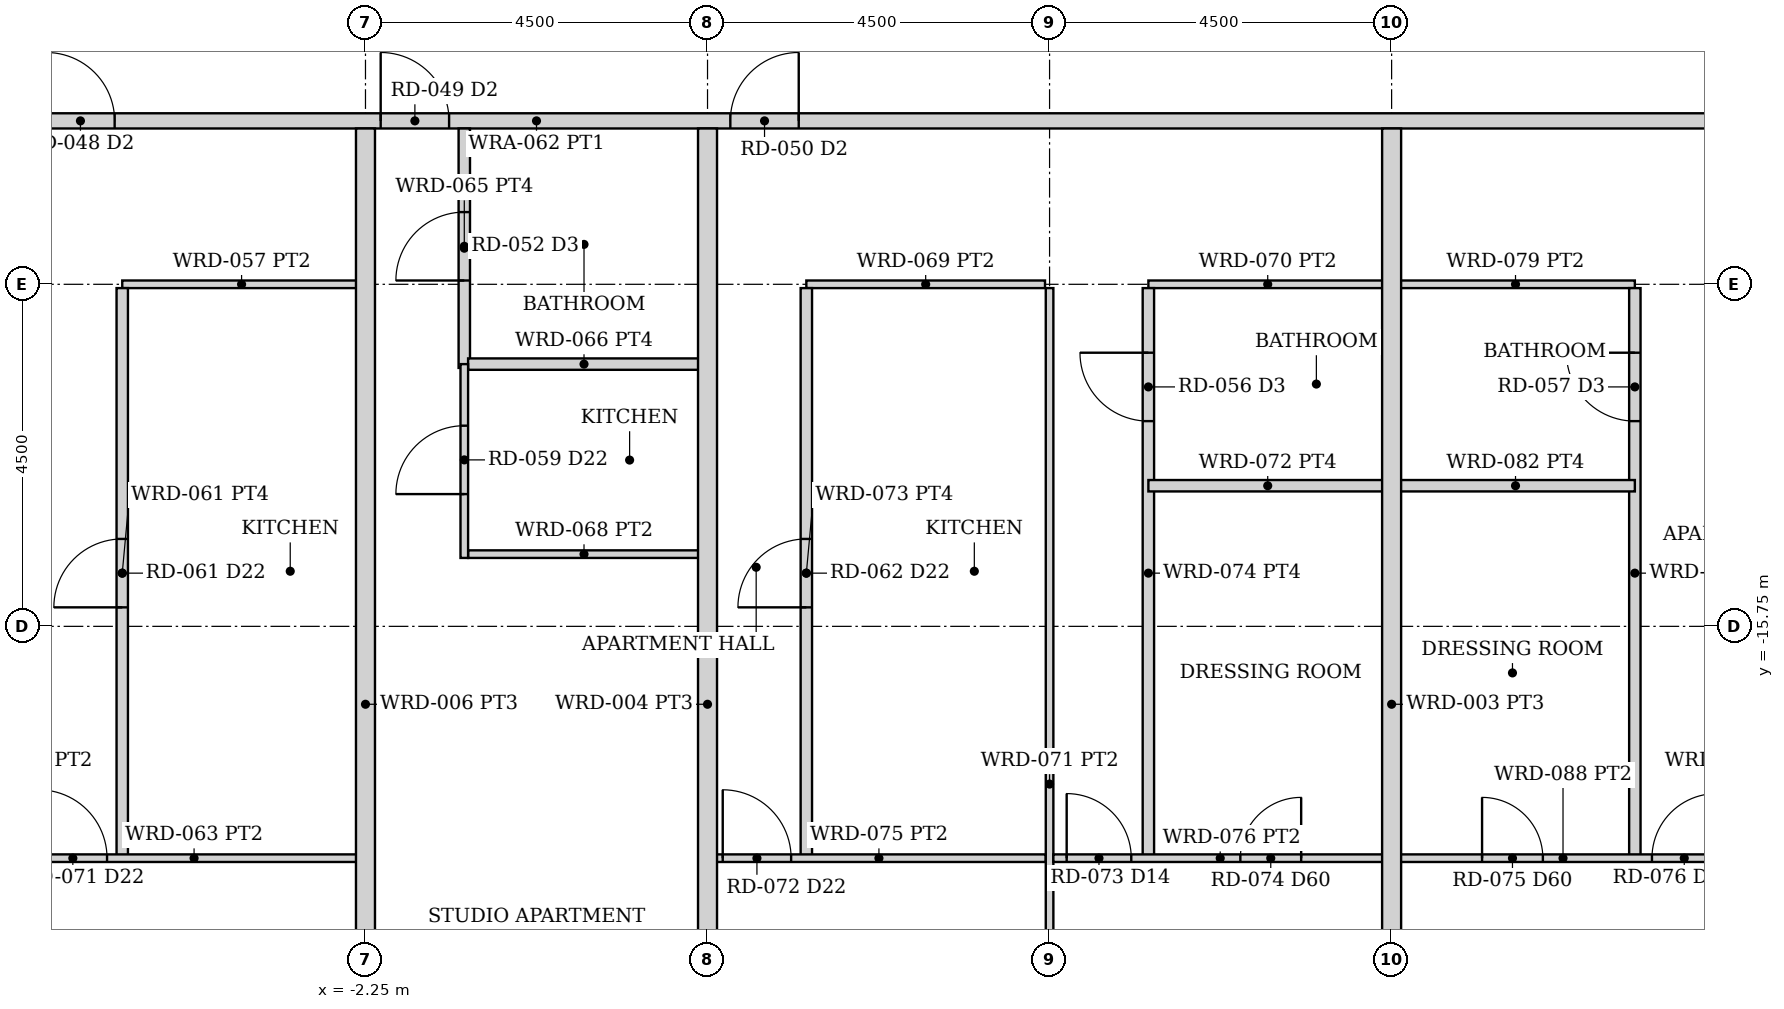
"""IFC4 building model, lengths in metres.
Left out: names, types, materials, properties, quantities, classifications, styles, units other than length and angle.
Written with IfcOpenShell. Run it as: python <this file> out.ifc"""

import sys

from ifc_helpers import new_model, si_unit, direction, frame, frame_2d, origin, place, context, subcontext, project, spatial, rectangle, extrude, element, fill, save


model = new_model("IFC4")
c1 = context("Model", 3, precision=1e-05, world=origin(), true_north=direction((0.0, 1.0)))
c2 = subcontext(c1, "Body", "Model", "MODEL_VIEW")
j1 = project(units=[si_unit("LENGTHUNIT", "METRE"), si_unit("PLANEANGLEUNIT", "RADIAN")], contexts=[c1])
p1 = place(None, origin())
s1 = spatial("IfcSite", under=j1, at=p1, CompositionType="ELEMENT")
p2 = place(p1, origin())
s2 = spatial("IfcBuilding", under=s1, at=p2, CompositionType="ELEMENT")
p3 = place(p2, frame((0.0, 0.0, 58.0)))
s3 = spatial("IfcBuildingStorey", under=s2, at=p3, CompositionType="ELEMENT", Elevation=58.0)
p4 = place(p3, frame((-24.55, -9.1, 0.0), z_axis=(0.0, 0.0, 1.0), x_axis=(1.0, 0.0, 0.0)))
e1 = element("IfcWall", 1, at=p4, inside=s3, PredefinedType="PARTITIONING", context=c2, shape_type="SweptSolid", body=[
    extrude(rectangle(XDim=49.1, YDim=0.2, at=frame_2d((24.55, 0.0))), origin(), (0.0, 0.0, 1.0), 2.373),
])
p5 = place(p4, frame((5.1, 0.0, 0.0)))
e2 = element("IfcOpeningElement", 2, at=p5, cuts=e1, PredefinedType="OPENING", context=c2, shape_type="SweptSolid", body=[
    extrude(rectangle(XDim=0.9, YDim=2.1, at=frame_2d((0.45, 1.05))), frame((0.0, 0.11, 0.0), z_axis=(0.0, -1.0, 0.0), x_axis=(1.0, 0.0, 0.0)), (0.0, 0.0, 1.0), 0.22),
])
p6 = place(p4, frame((18.1, 0.0, 0.0)))
e3 = element("IfcOpeningElement", 3, at=p6, cuts=e1, PredefinedType="OPENING", context=c2, shape_type="SweptSolid", body=[
    extrude(rectangle(XDim=0.9, YDim=2.1, at=frame_2d((0.45, 1.05))), frame((0.0, 0.11, 0.0), z_axis=(0.0, -1.0, 0.0), x_axis=(1.0, 0.0, 0.0)), (0.0, 0.0, 1.0), 0.22),
])
p7 = place(p4, frame((22.5, 0.0, 0.0)))
e4 = element("IfcOpeningElement", 4, at=p7, cuts=e1, PredefinedType="OPENING", context=c2, shape_type="SweptSolid", body=[
    extrude(rectangle(XDim=0.9, YDim=2.1, at=frame_2d((0.45, 1.05))), frame((0.0, 0.11, 0.0), z_axis=(0.0, -1.0, 0.0), x_axis=(1.0, 0.0, 0.0)), (0.0, 0.0, 1.0), 0.22),
])
p8 = place(p4, frame((27.1, 0.0, 0.0)))
e5 = element("IfcOpeningElement", 5, at=p8, cuts=e1, PredefinedType="OPENING", context=c2, shape_type="SweptSolid", body=[
    extrude(rectangle(XDim=0.9, YDim=2.1, at=frame_2d((0.45, 1.05))), frame((0.0, 0.11, 0.0), z_axis=(0.0, -1.0, 0.0), x_axis=(1.0, 0.0, 0.0)), (0.0, 0.0, 1.0), 0.22),
])
p9 = place(p4, frame((43.1, 0.0, 0.0)))
e6 = element("IfcOpeningElement", 6, at=p9, cuts=e1, PredefinedType="OPENING", context=c2, shape_type="SweptSolid", body=[
    extrude(rectangle(XDim=0.9, YDim=2.1, at=frame_2d((0.45, 1.05))), frame((0.0, 0.11, 0.0), z_axis=(0.0, -1.0, 0.0), x_axis=(1.0, 0.0, 0.0)), (0.0, 0.0, 1.0), 0.22),
])
p10 = place(p3, frame((-5.45, -11.25, 0.0), z_axis=(0.0, 0.0, 1.0), x_axis=(1.0, 0.0, 0.0)))
e7 = element("IfcWall", 7, at=p10, inside=s3, PredefinedType="PARTITIONING", context=c2, shape_type="SweptSolid", body=[
    extrude(rectangle(XDim=3.14, YDim=0.1, at=frame_2d((1.57, 0.0))), origin(), (0.0, 0.0, 1.0), 2.373),
])
p11 = place(p3, frame((-5.45, -18.8, 0.0), z_axis=(0.0, 0.0, 1.0), x_axis=(0.0, 1.0, 0.0)))
e8 = element("IfcWall", 8, at=p11, inside=s3, PredefinedType="PARTITIONING", context=c2, shape_type="SweptSolid", body=[
    extrude(rectangle(XDim=7.5, YDim=0.15, at=frame_2d((3.75, 0.0))), origin(), (0.0, 0.0, 1.0), 2.373),
])
p12 = place(p11, frame((3.3, 0.0, 0.0)))
e9 = element("IfcOpeningElement", 9, at=p12, cuts=e8, PredefinedType="OPENING", context=c2, shape_type="SweptSolid", body=[
    extrude(rectangle(XDim=0.9, YDim=2.1, at=frame_2d((0.45, 1.05))), frame((0.0, 0.085, 0.0), z_axis=(0.0, -1.0, 0.0), x_axis=(1.0, 0.0, 0.0)), (0.0, 0.0, 1.0), 0.17),
])
p13 = place(p3, frame((-6.7, -18.8, 0.0), z_axis=(0.0, 0.0, 1.0), x_axis=(1.0, 0.0, 0.0)))
e10 = element("IfcWall", 10, at=p13, inside=s3, PredefinedType="PARTITIONING", context=c2, shape_type="SweptSolid", body=[
    extrude(rectangle(XDim=4.39, YDim=0.1, at=frame_2d((2.195, 0.0))), origin(), (0.0, 0.0, 1.0), 2.373),
])
p14 = place(p13, frame((0.15, 0.0, 0.0)))
e11 = element("IfcOpeningElement", 11, at=p14, cuts=e10, PredefinedType="OPENING", context=c2, shape_type="SweptSolid", body=[
    extrude(rectangle(XDim=0.9, YDim=2.1, at=frame_2d((0.45, 1.05))), frame((0.0, 0.06, 0.0), z_axis=(0.0, -1.0, 0.0), x_axis=(1.0, 0.0, 0.0)), (0.0, 0.0, 1.0), 0.12),
])
p15 = place(p3, frame((-0.95, -12.35, 0.0), z_axis=(0.0, 0.0, 1.0), x_axis=(0.0, 1.0, 0.0)))
e12 = element("IfcWall", 12, at=p15, inside=s3, PredefinedType="PARTITIONING", context=c2, shape_type="SweptSolid", body=[
    extrude(rectangle(XDim=3.15, YDim=0.15, at=frame_2d((1.575, 0.0))), origin(), (0.0, 0.0, 1.0), 2.373),
])
p16 = place(p15, frame((1.15, 0.0, 0.0)))
e13 = element("IfcOpeningElement", 13, at=p16, cuts=e12, PredefinedType="OPENING", context=c2, shape_type="SweptSolid", body=[
    extrude(rectangle(XDim=0.9, YDim=2.1, at=frame_2d((0.45, 1.05))), frame((0.0, 0.085, 0.0), z_axis=(0.0, -1.0, 0.0), x_axis=(1.0, 0.0, 0.0)), (0.0, 0.0, 1.0), 0.17),
])
p17 = place(p3, frame((-0.9, -12.3, 0.0), z_axis=(0.0, 0.0, 1.0), x_axis=(1.0, 0.0, 0.0)))
e14 = element("IfcWall", 14, at=p17, inside=s3, PredefinedType="PARTITIONING", context=c2, shape_type="SweptSolid", body=[
    extrude(rectangle(XDim=3.05, YDim=0.15, at=frame_2d((1.525, 0.0))), origin(), (0.0, 0.0, 1.0), 2.373),
])
p18 = place(p3, frame((-0.9, -14.8, 0.0), z_axis=(0.0, 0.0, 1.0), x_axis=(1.0, 0.0, 0.0)))
e15 = element("IfcWall", 15, at=p18, inside=s3, PredefinedType="PARTITIONING", context=c2, shape_type="SweptSolid", body=[
    extrude(rectangle(XDim=3.05, YDim=0.1, at=frame_2d((1.525, 0.0))), origin(), (0.0, 0.0, 1.0), 2.373),
])
p19 = place(p3, frame((-0.95, -14.85, 0.0), z_axis=(0.0, 0.0, 1.0), x_axis=(0.0, 1.0, 0.0)))
e16 = element("IfcWall", 16, at=p19, inside=s3, PredefinedType="PARTITIONING", context=c2, shape_type="SweptSolid", body=[
    extrude(rectangle(XDim=2.55, YDim=0.1, at=frame_2d((1.275, 0.0))), origin(), (0.0, 0.0, 1.0), 2.373),
])
p20 = place(p19, frame((0.84, 0.0, 0.0)))
e17 = element("IfcOpeningElement", 17, at=p20, cuts=e16, PredefinedType="OPENING", context=c2, shape_type="SweptSolid", body=[
    extrude(rectangle(XDim=0.9, YDim=2.1, at=frame_2d((0.45, 1.05))), frame((0.0, 0.06, 0.0), z_axis=(0.0, -1.0, 0.0), x_axis=(1.0, 0.0, 0.0)), (0.0, 0.0, 1.0), 0.12),
])
p21 = place(p3, frame((3.55, -11.25, 0.0), z_axis=(0.0, 0.0, 1.0), x_axis=(1.0, 0.0, 0.0)))
e18 = element("IfcWall", 18, at=p21, inside=s3, PredefinedType="PARTITIONING", context=c2, shape_type="SweptSolid", body=[
    extrude(rectangle(XDim=3.14, YDim=0.1, at=frame_2d((1.57, 0.0))), origin(), (0.0, 0.0, 1.0), 2.373),
])
p22 = place(p3, frame((3.55, -18.8, 0.0), z_axis=(0.0, 0.0, 1.0), x_axis=(0.0, 1.0, 0.0)))
e19 = element("IfcWall", 19, at=p22, inside=s3, PredefinedType="PARTITIONING", context=c2, shape_type="SweptSolid", body=[
    extrude(rectangle(XDim=7.5, YDim=0.15, at=frame_2d((3.75, 0.0))), origin(), (0.0, 0.0, 1.0), 2.373),
])
p23 = place(p22, frame((3.3, 0.0, 0.0)))
e20 = element("IfcOpeningElement", 20, at=p23, cuts=e19, PredefinedType="OPENING", context=c2, shape_type="SweptSolid", body=[
    extrude(rectangle(XDim=0.9, YDim=2.1, at=frame_2d((0.45, 1.05))), frame((0.0, 0.085, 0.0), z_axis=(0.0, -1.0, 0.0), x_axis=(1.0, 0.0, 0.0)), (0.0, 0.0, 1.0), 0.17),
])
p24 = place(p3, frame((2.31, -18.8, 0.0), z_axis=(0.0, 0.0, 1.0), x_axis=(1.0, 0.0, 0.0)))
e21 = element("IfcWall", 21, at=p24, inside=s3, PredefinedType="PARTITIONING", context=c2, shape_type="SweptSolid", body=[
    extrude(rectangle(XDim=4.39, YDim=0.1, at=frame_2d((2.195, 0.0))), origin(), (0.0, 0.0, 1.0), 2.373),
])
p25 = place(p24, frame((0.14, 0.0, 0.0)))
e22 = element("IfcOpeningElement", 22, at=p25, cuts=e21, PredefinedType="OPENING", context=c2, shape_type="SweptSolid", body=[
    extrude(rectangle(XDim=0.9, YDim=2.1, at=frame_2d((0.45, 1.05))), frame((0.0, 0.06, 0.0), z_axis=(0.0, -1.0, 0.0), x_axis=(1.0, 0.0, 0.0)), (0.0, 0.0, 1.0), 0.12),
])
p26 = place(p3, frame((6.75, -24.35, 0.0), z_axis=(0.0, 0.0, 1.0), x_axis=(0.0, 1.0, 0.0)))
e23 = element("IfcWall", 23, at=p26, inside=s3, PredefinedType="PARTITIONING", context=c2, shape_type="SweptSolid", body=[
    extrude(rectangle(XDim=13.05, YDim=0.1, at=frame_2d((6.525, 0.0))), origin(), (0.0, 0.0, 1.0), 2.373),
])
p27 = place(p3, frame((8.05, -11.25, 0.0), z_axis=(0.0, 0.0, 1.0), x_axis=(1.0, 0.0, 0.0)))
e24 = element("IfcWall", 24, at=p27, inside=s3, PredefinedType="PARTITIONING", context=c2, shape_type="SweptSolid", body=[
    extrude(rectangle(XDim=3.14, YDim=0.1, at=frame_2d((1.57, 0.0))), origin(), (0.0, 0.0, 1.0), 2.373),
])
p28 = place(p3, frame((8.05, -18.8, 0.0), z_axis=(0.0, 0.0, 1.0), x_axis=(0.0, 1.0, 0.0)))
e25 = element("IfcWall", 25, at=p28, inside=s3, PredefinedType="PARTITIONING", context=c2, shape_type="SweptSolid", body=[
    extrude(rectangle(XDim=7.5, YDim=0.15, at=frame_2d((3.75, 0.0))), origin(), (0.0, 0.0, 1.0), 2.373),
])
p29 = place(p28, frame((5.75, 0.0, 0.0)))
e26 = element("IfcOpeningElement", 26, at=p29, cuts=e25, PredefinedType="OPENING", context=c2, shape_type="SweptSolid", body=[
    extrude(rectangle(XDim=0.9, YDim=2.1, at=frame_2d((0.45, 1.05))), frame((0.0, 0.085, 0.0), z_axis=(0.0, -1.0, 0.0), x_axis=(1.0, 0.0, 0.0)), (0.0, 0.0, 1.0), 0.17),
])
p30 = place(p3, frame((6.8, -18.8, 0.0), z_axis=(0.0, 0.0, 1.0), x_axis=(1.0, 0.0, 0.0)))
e27 = element("IfcWall", 27, at=p30, inside=s3, PredefinedType="PARTITIONING", context=c2, shape_type="SweptSolid", body=[
    extrude(rectangle(XDim=4.39, YDim=0.1, at=frame_2d((2.195, 0.0))), origin(), (0.0, 0.0, 1.0), 2.373),
])
p31 = place(p30, frame((0.175, 0.0, 0.0)))
e28 = element("IfcOpeningElement", 28, at=p31, cuts=e27, PredefinedType="OPENING", context=c2, shape_type="SweptSolid", body=[
    extrude(rectangle(XDim=0.85, YDim=2.1, at=frame_2d((0.425, 1.05))), frame((0.0, 0.06, 0.0), z_axis=(0.0, -1.0, 0.0), x_axis=(1.0, 0.0, 0.0)), (0.0, 0.0, 1.0), 0.12),
])
p32 = place(p30, frame((2.46, 0.0, 0.0)))
e29 = element("IfcOpeningElement", 29, at=p32, cuts=e27, PredefinedType="OPENING", context=c2, shape_type="SweptSolid", body=[
    extrude(rectangle(XDim=0.8, YDim=2.1, at=frame_2d((0.4, 1.05))), frame((0.0, 0.06, 0.0), z_axis=(0.0, -1.0, 0.0), x_axis=(1.0, 0.0, 0.0)), (0.0, 0.0, 1.0), 0.12),
])
p33 = place(p3, frame((8.05, -13.9, 0.0), z_axis=(0.0, 0.0, 1.0), x_axis=(1.0, 0.0, 0.0)))
e30 = element("IfcWall", 30, at=p33, inside=s3, PredefinedType="PARTITIONING", context=c2, shape_type="SweptSolid", body=[
    extrude(rectangle(XDim=3.14, YDim=0.15, at=frame_2d((1.57, 0.0))), origin(), (0.0, 0.0, 1.0), 2.373),
])
p34 = place(p3, frame((11.31, -11.25, 0.0), z_axis=(0.0, 0.0, 1.0), x_axis=(1.0, 0.0, 0.0)))
e31 = element("IfcWall", 31, at=p34, inside=s3, PredefinedType="PARTITIONING", context=c2, shape_type="SweptSolid", body=[
    extrude(rectangle(XDim=3.14, YDim=0.1, at=frame_2d((1.57, 0.0))), origin(), (0.0, 0.0, 1.0), 2.373),
])
p35 = place(p3, frame((14.45, -18.8, 0.0), z_axis=(0.0, 0.0, 1.0), x_axis=(0.0, 1.0, 0.0)))
e32 = element("IfcWall", 32, at=p35, inside=s3, PredefinedType="PARTITIONING", context=c2, shape_type="SweptSolid", body=[
    extrude(rectangle(XDim=7.5, YDim=0.15, at=frame_2d((3.75, 0.0))), origin(), (0.0, 0.0, 1.0), 2.373),
])
p36 = place(p35, frame((5.75, 0.0, 0.0)))
e33 = element("IfcOpeningElement", 33, at=p36, cuts=e32, PredefinedType="OPENING", context=c2, shape_type="SweptSolid", body=[
    extrude(rectangle(XDim=0.9, YDim=2.1, at=frame_2d((0.45, 1.05))), frame((0.0, 0.085, 0.0), z_axis=(0.0, -1.0, 0.0), x_axis=(1.0, 0.0, 0.0)), (0.0, 0.0, 1.0), 0.17),
])
p37 = place(p3, frame((11.31, -18.8, 0.0), z_axis=(0.0, 0.0, 1.0), x_axis=(1.0, 0.0, 0.0)))
e34 = element("IfcWall", 34, at=p37, inside=s3, PredefinedType="PARTITIONING", context=c2, shape_type="SweptSolid", body=[
    extrude(rectangle(XDim=4.39, YDim=0.1, at=frame_2d((2.195, 0.0))), origin(), (0.0, 0.0, 1.0), 2.373),
])
p38 = place(p37, frame((3.365, 0.0, 0.0)))
e35 = element("IfcOpeningElement", 35, at=p38, cuts=e34, PredefinedType="OPENING", context=c2, shape_type="SweptSolid", body=[
    extrude(rectangle(XDim=0.85, YDim=2.1, at=frame_2d((0.425, 1.05))), frame((0.0, 0.06, 0.0), z_axis=(0.0, -1.0, 0.0), x_axis=(1.0, 0.0, 0.0)), (0.0, 0.0, 1.0), 0.12),
])
p39 = place(p37, frame((1.13, 0.0, 0.0)))
e36 = element("IfcOpeningElement", 36, at=p39, cuts=e34, PredefinedType="OPENING", context=c2, shape_type="SweptSolid", body=[
    extrude(rectangle(XDim=0.8, YDim=2.1, at=frame_2d((0.4, 1.05))), frame((0.0, 0.06, 0.0), z_axis=(0.0, -1.0, 0.0), x_axis=(1.0, 0.0, 0.0)), (0.0, 0.0, 1.0), 0.12),
])
p40 = place(p3, frame((11.31, -13.9, 0.0), z_axis=(0.0, 0.0, 1.0), x_axis=(1.0, 0.0, 0.0)))
e37 = element("IfcWall", 37, at=p40, inside=s3, PredefinedType="PARTITIONING", context=c2, shape_type="SweptSolid", body=[
    extrude(rectangle(XDim=3.14, YDim=0.15, at=frame_2d((1.57, 0.0))), origin(), (0.0, 0.0, 1.0), 2.373),
])
for number, where, z_axis, x_axis in (
    (38, (-2.25, -24.35, 0.0), (0.0, 0.0, 1.0), (0.0, 1.0, 0.0)),
    (39, (2.25, -24.35, 0.0), (0.0, 0.0, 1.0), (0.0, 1.0, 0.0)),
    (40, (11.25, -24.35, 0.0), (0.0, 0.0, 1.0), (0.0, 1.0, 0.0)),
):
    element("IfcWall", number, at=place(p3, frame(where, z_axis=z_axis, x_axis=x_axis)), inside=s3, PredefinedType="PARTITIONING", context=c2, shape_type="SweptSolid", body=[
        extrude(rectangle(XDim=15.15, YDim=0.25, at=frame_2d((7.575, 0.0))), origin(), (0.0, 0.0, 1.0), 2.373),
    ])
p41 = place(p6, origin())
e41 = element("IfcDoor", 41, at=p41, inside=s3, OperationType="SINGLE_SWING_LEFT", PredefinedType="DOOR", context=c2, shape_type="SweptSolid", body=[
    extrude(rectangle(XDim=0.9, YDim=2.1, at=frame_2d((0.45, 1.05))), frame((0.0, 0.025, 0.0), z_axis=(0.0, -1.0, 0.0), x_axis=(1.0, 0.0, 0.0)), (0.0, 0.0, 1.0), 0.05),
])
fill(e3, e41)
p42 = place(p12, origin())
e42 = element("IfcDoor", 42, at=p42, inside=s3, OperationType="SINGLE_SWING_LEFT", PredefinedType="DOOR", context=c2, shape_type="SweptSolid", body=[
    extrude(rectangle(XDim=0.9, YDim=2.1, at=frame_2d((0.45, 1.05))), frame((0.0, 0.025, 0.0), z_axis=(0.0, -1.0, 0.0), x_axis=(1.0, 0.0, 0.0)), (0.0, 0.0, 1.0), 0.05),
])
fill(e9, e42)
p43 = place(p14, origin())
e43 = element("IfcDoor", 43, at=p43, inside=s3, OperationType="SINGLE_SWING_LEFT", PredefinedType="DOOR", context=c2, shape_type="SweptSolid", body=[
    extrude(rectangle(XDim=0.9, YDim=2.1, at=frame_2d((0.45, 1.05))), frame((0.0, 0.025, 0.0), z_axis=(0.0, -1.0, 0.0), x_axis=(1.0, 0.0, 0.0)), (0.0, 0.0, 1.0), 0.05),
])
fill(e11, e43)
p44 = place(p7, origin())
e44 = element("IfcDoor", 44, at=p44, inside=s3, OperationType="SINGLE_SWING_LEFT", PredefinedType="DOOR", context=c2, shape_type="SweptSolid", body=[
    extrude(rectangle(XDim=0.9, YDim=2.1, at=frame_2d((0.45, 1.05))), frame((0.0, 0.025, 0.0), z_axis=(0.0, -1.0, 0.0), x_axis=(1.0, 0.0, 0.0)), (0.0, 0.0, 1.0), 0.05),
])
fill(e4, e44)
p45 = place(p16, origin())
e45 = element("IfcDoor", 45, at=p45, inside=s3, OperationType="SINGLE_SWING_LEFT", PredefinedType="DOOR", context=c2, shape_type="SweptSolid", body=[
    extrude(rectangle(XDim=0.9, YDim=2.1, at=frame_2d((0.45, 1.05))), frame((0.0, 0.025, 0.0), z_axis=(0.0, -1.0, 0.0), x_axis=(1.0, 0.0, 0.0)), (0.0, 0.0, 1.0), 0.05),
])
fill(e13, e45)
p46 = place(p20, origin())
e46 = element("IfcDoor", 46, at=p46, inside=s3, OperationType="SINGLE_SWING_LEFT", PredefinedType="DOOR", context=c2, shape_type="SweptSolid", body=[
    extrude(rectangle(XDim=0.9, YDim=2.1, at=frame_2d((0.45, 1.05))), frame((0.0, 0.025, 0.0), z_axis=(0.0, -1.0, 0.0), x_axis=(1.0, 0.0, 0.0)), (0.0, 0.0, 1.0), 0.05),
])
fill(e17, e46)
p47 = place(p8, origin())
e47 = element("IfcDoor", 47, at=p47, inside=s3, OperationType="SINGLE_SWING_RIGHT", PredefinedType="DOOR", context=c2, shape_type="SweptSolid", body=[
    extrude(rectangle(XDim=0.9, YDim=2.1, at=frame_2d((0.45, 1.05))), frame((0.0, 0.025, 0.0), z_axis=(0.0, -1.0, 0.0), x_axis=(1.0, 0.0, 0.0)), (0.0, 0.0, 1.0), 0.05),
])
fill(e5, e47)
p48 = place(p23, origin())
e48 = element("IfcDoor", 48, at=p48, inside=s3, OperationType="SINGLE_SWING_LEFT", PredefinedType="DOOR", context=c2, shape_type="SweptSolid", body=[
    extrude(rectangle(XDim=0.9, YDim=2.1, at=frame_2d((0.45, 1.05))), frame((0.0, 0.025, 0.0), z_axis=(0.0, -1.0, 0.0), x_axis=(1.0, 0.0, 0.0)), (0.0, 0.0, 1.0), 0.05),
])
fill(e20, e48)
p49 = place(p25, origin())
e49 = element("IfcDoor", 49, at=p49, inside=s3, OperationType="SINGLE_SWING_LEFT", PredefinedType="DOOR", context=c2, shape_type="SweptSolid", body=[
    extrude(rectangle(XDim=0.9, YDim=2.1, at=frame_2d((0.45, 1.05))), frame((0.0, 0.025, 0.0), z_axis=(0.0, -1.0, 0.0), x_axis=(1.0, 0.0, 0.0)), (0.0, 0.0, 1.0), 0.05),
])
fill(e22, e49)
p50 = place(p31, origin())
e50 = element("IfcDoor", 50, at=p50, inside=s3, OperationType="SINGLE_SWING_LEFT", PredefinedType="DOOR", context=c2, shape_type="SweptSolid", body=[
    extrude(rectangle(XDim=0.85, YDim=2.1, at=frame_2d((0.425, 1.05))), frame((0.0, 0.025, 0.0), z_axis=(0.0, -1.0, 0.0), x_axis=(1.0, 0.0, 0.0)), (0.0, 0.0, 1.0), 0.05),
])
fill(e28, e50)
p51 = place(p29, origin())
e51 = element("IfcDoor", 51, at=p51, inside=s3, OperationType="SINGLE_SWING_RIGHT", PredefinedType="DOOR", context=c2, shape_type="SweptSolid", body=[
    extrude(rectangle(XDim=0.9, YDim=2.1, at=frame_2d((0.45, 1.05))), frame((0.0, 0.025, 0.0), z_axis=(0.0, -1.0, 0.0), x_axis=(1.0, 0.0, 0.0)), (0.0, 0.0, 1.0), 0.05),
])
fill(e26, e51)
p52 = place(p32, origin())
e52 = element("IfcDoor", 52, at=p52, inside=s3, OperationType="SINGLE_SWING_RIGHT", PredefinedType="DOOR", context=c2, shape_type="SweptSolid", body=[
    extrude(rectangle(XDim=0.8, YDim=2.1, at=frame_2d((0.4, 1.05))), frame((0.0, 0.025, 0.0), z_axis=(0.0, -1.0, 0.0), x_axis=(1.0, 0.0, 0.0)), (0.0, 0.0, 1.0), 0.05),
])
fill(e29, e52)
p53 = place(p38, origin())
e53 = element("IfcDoor", 53, at=p53, inside=s3, OperationType="SINGLE_SWING_RIGHT", PredefinedType="DOOR", context=c2, shape_type="SweptSolid", body=[
    extrude(rectangle(XDim=0.85, YDim=2.1, at=frame_2d((0.425, 1.05))), frame((0.0, 0.025, 0.0), z_axis=(0.0, -1.0, 0.0), x_axis=(1.0, 0.0, 0.0)), (0.0, 0.0, 1.0), 0.05),
])
fill(e35, e53)
p54 = place(p36, origin())
e54 = element("IfcDoor", 54, at=p54, inside=s3, OperationType="SINGLE_SWING_RIGHT", PredefinedType="DOOR", context=c2, shape_type="SweptSolid", body=[
    extrude(rectangle(XDim=0.9, YDim=2.1, at=frame_2d((0.45, 1.05))), frame((0.0, 0.025, 0.0), z_axis=(0.0, -1.0, 0.0), x_axis=(1.0, 0.0, 0.0)), (0.0, 0.0, 1.0), 0.05),
])
fill(e33, e54)
p55 = place(p39, origin())
e55 = element("IfcDoor", 55, at=p55, inside=s3, OperationType="SINGLE_SWING_LEFT", PredefinedType="DOOR", context=c2, shape_type="SweptSolid", body=[
    extrude(rectangle(XDim=0.8, YDim=2.1, at=frame_2d((0.4, 1.05))), frame((0.0, 0.025, 0.0), z_axis=(0.0, -1.0, 0.0), x_axis=(1.0, 0.0, 0.0)), (0.0, 0.0, 1.0), 0.05),
])
fill(e36, e55)
save(model, sys.argv[1])
